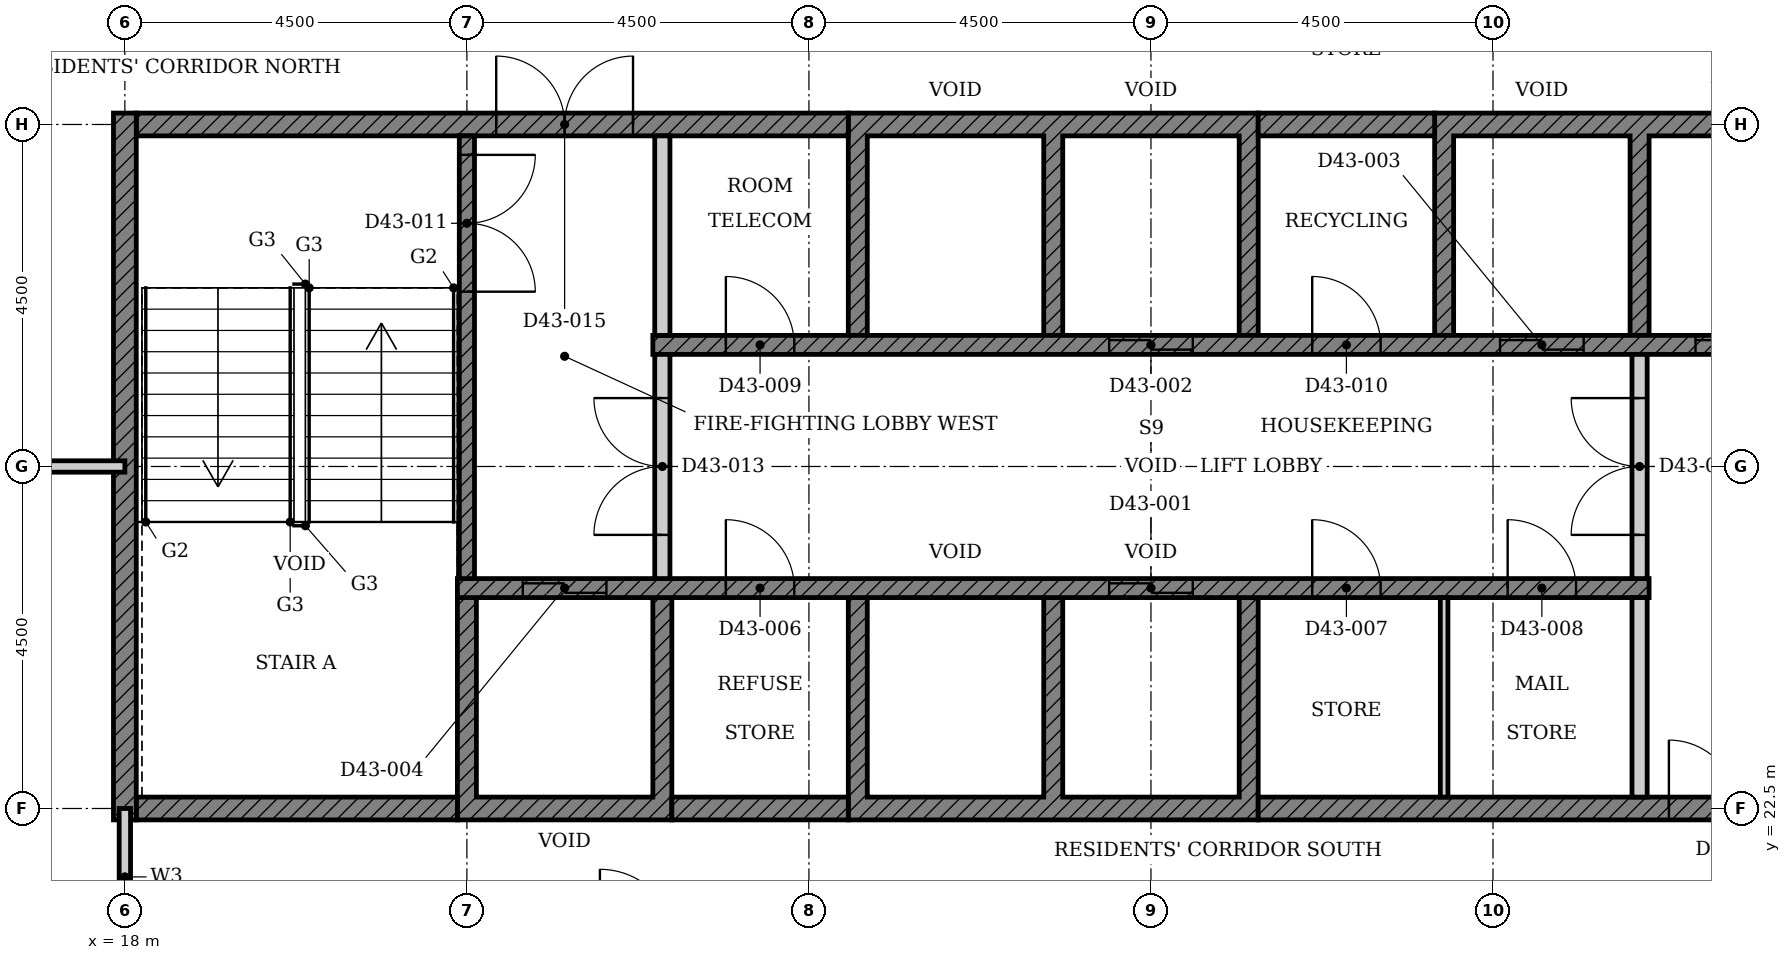
"""IFC4 building model, lengths in metres.
Left out: names, types, materials, properties, quantities, classifications, styles, units other than length and angle.
Written with IfcOpenShell. Run it as: python <this file> out.ifc"""

import sys

from ifc_helpers import new_model, si_unit, direction, frame, frame_2d, origin, place, context, subcontext, project, spatial, polyline, rectangle, outline, extrude, element, fill, save


model = new_model("IFC4")
c1 = context("Model", 3, precision=1e-05, world=origin(), true_north=direction((0.0, 1.0)))
c2 = subcontext(c1, "Body", "Model", "MODEL_VIEW")
j1 = project(units=[si_unit("LENGTHUNIT", "METRE"), si_unit("PLANEANGLEUNIT", "RADIAN")], contexts=[c1])
p1 = place(None, origin())
s1 = spatial("IfcSite", under=j1, at=p1, CompositionType="ELEMENT")
p2 = place(p1, origin())
s2 = spatial("IfcBuilding", under=s1, at=p2, CompositionType="ELEMENT")
p3 = place(p2, frame((0.0, 0.0, 172.8)))
s3 = spatial("IfcBuildingStorey", under=s2, at=p3, CompositionType="ELEMENT", Elevation=172.8)
p4 = place(p3, origin())
e1 = element("IfcWall", 1, at=p4, inside=s3, PredefinedType="SHEAR", context=c2, shape_type="SweptSolid", body=[
    extrude(outline(polyline([(22.375, 22.35), (25.197, 22.35), (25.197, 25.275), (24.947, 25.275), (24.947, 22.65), (22.625, 22.65), (22.625, 25.275), (22.375, 25.275), (22.375, 22.35)])), origin(), (0.0, 0.0, 1.0), 3.4),
])
p5 = place(p3, origin())
e2 = element("IfcWall", 2, at=p5, inside=s3, PredefinedType="SHEAR", context=c2, shape_type="SweptSolid", body=[
    extrude(outline(polyline([(27.518, 22.35), (32.911, 22.35), (32.911, 25.275), (32.661, 25.275), (32.661, 22.65), (30.339, 22.65), (30.339, 25.275), (30.089, 25.275), (30.089, 22.65), (27.768, 22.65), (27.768, 25.275), (27.518, 25.275), (27.518, 22.35)])), origin(), (0.0, 0.0, 1.0), 3.4),
])
p6 = place(p3, origin())
e3 = element("IfcWall", 3, at=p6, inside=s3, PredefinedType="SHEAR", context=c2, shape_type="SweptSolid", body=[
    extrude(outline(polyline([(27.518, 28.725), (27.768, 28.725), (27.768, 31.35), (30.089, 31.35), (30.089, 28.725), (30.339, 28.725), (30.339, 31.35), (32.661, 31.35), (32.661, 28.725), (32.911, 28.725), (32.911, 31.65), (27.518, 31.65), (27.518, 28.725)])), origin(), (0.0, 0.0, 1.0), 3.4),
])
p7 = place(p3, origin())
e4 = element("IfcWall", 4, at=p7, inside=s3, PredefinedType="SHEAR", context=c2, shape_type="SweptSolid", body=[
    extrude(outline(polyline([(35.232, 28.725), (35.482, 28.725), (35.482, 31.35), (37.803, 31.35), (37.803, 28.725), (38.053, 28.725), (38.053, 31.35), (40.375, 31.35), (40.375, 28.725), (40.625, 28.725), (40.625, 31.65), (35.232, 31.65), (35.232, 28.725)])), origin(), (0.0, 0.0, 1.0), 3.4),
])
p8 = place(p3, frame((18.15, 22.5, 0.0), z_axis=(0.0, 0.0, 1.0), x_axis=(1.0, 0.0, 0.0)))
e5 = element("IfcWall", 5, at=p8, inside=s3, PredefinedType="SHEAR", context=c2, shape_type="SweptSolid", body=[
    extrude(rectangle(XDim=4.225, YDim=0.3, at=frame_2d((2.113, 0.0))), origin(), (0.0, 0.0, 1.0), 3.4),
])
p9 = place(p3, frame((25.197, 22.5, 0.0), z_axis=(0.0, 0.0, 1.0), x_axis=(1.0, 0.0, 0.0)))
e6 = element("IfcWall", 6, at=p9, inside=s3, PredefinedType="SHEAR", context=c2, shape_type="SweptSolid", body=[
    extrude(rectangle(XDim=2.321, YDim=0.3, at=frame_2d((1.161, 0.0))), origin(), (0.0, 0.0, 1.0), 3.4),
])
p10 = place(p3, frame((32.911, 22.5, 0.0), z_axis=(0.0, 0.0, 1.0), x_axis=(1.0, 0.0, 0.0)))
e7 = element("IfcWall", 7, at=p10, inside=s3, PredefinedType="SHEAR", context=c2, shape_type="SweptSolid", body=[
    extrude(rectangle(XDim=11.939, YDim=0.3, at=frame_2d((5.97, 0.0))), origin(), (0.0, 0.0, 1.0), 3.4),
])
p11 = place(p10, frame((5.404, 0.0, 0.0)))
e8 = element("IfcOpeningElement", 8, at=p11, cuts=e7, PredefinedType="OPENING", context=c2, shape_type="SweptSolid", body=[
    extrude(rectangle(XDim=1.8, YDim=2.1, at=frame_2d((0.9, 1.05))), frame((0.0, 0.16, 0.0), z_axis=(0.0, -1.0, 0.0), x_axis=(1.0, 0.0, 0.0)), (0.0, 0.0, 1.0), 0.32),
])
p12 = place(p3, frame((18.15, 31.5, 0.0), z_axis=(0.0, 0.0, 1.0), x_axis=(1.0, 0.0, 0.0)))
e9 = element("IfcWall", 9, at=p12, inside=s3, PredefinedType="SHEAR", context=c2, shape_type="SweptSolid", body=[
    extrude(rectangle(XDim=9.368, YDim=0.3, at=frame_2d((4.684, 0.0))), origin(), (0.0, 0.0, 1.0), 3.4),
])
p13 = place(p12, frame((4.736, 0.0, 0.0)))
e10 = element("IfcOpeningElement", 10, at=p13, cuts=e9, PredefinedType="OPENING", context=c2, shape_type="SweptSolid", body=[
    extrude(rectangle(XDim=1.8, YDim=2.1, at=frame_2d((0.9, 1.05))), frame((0.0, 0.16, 0.0), z_axis=(0.0, -1.0, 0.0), x_axis=(1.0, 0.0, 0.0)), (0.0, 0.0, 1.0), 0.32),
])
p14 = place(p3, frame((32.911, 31.5, 0.0), z_axis=(0.0, 0.0, 1.0), x_axis=(1.0, 0.0, 0.0)))
e11 = element("IfcWall", 11, at=p14, inside=s3, PredefinedType="SHEAR", context=c2, shape_type="SweptSolid", body=[
    extrude(rectangle(XDim=2.322, YDim=0.3, at=frame_2d((1.161, 0.0))), origin(), (0.0, 0.0, 1.0), 3.4),
])
p15 = place(p3, frame((18.0, 22.35, 0.0), z_axis=(0.0, 0.0, 1.0), x_axis=(0.0, 1.0, 0.0)))
e12 = element("IfcWall", 12, at=p15, inside=s3, PredefinedType="SHEAR", context=c2, shape_type="SweptSolid", body=[
    extrude(rectangle(XDim=9.3, YDim=0.3, at=frame_2d((4.65, 0.0))), origin(), (0.0, 0.0, 1.0), 3.4),
])
p16 = place(p3, frame((22.375, 25.4, 0.0), z_axis=(0.0, 0.0, 1.0), x_axis=(1.0, 0.0, 0.0)))
e13 = element("IfcWall", 13, at=p16, inside=s3, PredefinedType="SHEAR", context=c2, shape_type="SweptSolid", body=[
    extrude(rectangle(XDim=15.678, YDim=0.25, at=frame_2d((7.839, 0.0))), origin(), (0.0, 0.0, 1.0), 3.4),
])
p17 = place(p16, frame((8.575, 0.0, 0.0)))
e14 = element("IfcOpeningElement", 14, at=p17, cuts=e13, PredefinedType="OPENING", context=c2, shape_type="SweptSolid", body=[
    extrude(rectangle(XDim=1.1, YDim=2.1, at=frame_2d((0.55, 1.05))), frame((0.0, 0.135, 0.0), z_axis=(0.0, -1.0, 0.0), x_axis=(1.0, 0.0, 0.0)), (0.0, 0.0, 1.0), 0.27),
])
p18 = place(p16, frame((0.861, 0.0, 0.0)))
e15 = element("IfcOpeningElement", 15, at=p18, cuts=e13, PredefinedType="OPENING", context=c2, shape_type="SweptSolid", body=[
    extrude(rectangle(XDim=1.1, YDim=2.1, at=frame_2d((0.55, 1.05))), frame((0.0, 0.135, 0.0), z_axis=(0.0, -1.0, 0.0), x_axis=(1.0, 0.0, 0.0)), (0.0, 0.0, 1.0), 0.27),
])
p19 = place(p16, frame((3.532, 0.0, 0.0)))
e16 = element("IfcOpeningElement", 16, at=p19, cuts=e13, PredefinedType="OPENING", context=c2, shape_type="SweptSolid", body=[
    extrude(rectangle(XDim=0.9, YDim=2.1, at=frame_2d((0.45, 1.05))), frame((0.0, 0.135, 0.0), z_axis=(0.0, -1.0, 0.0), x_axis=(1.0, 0.0, 0.0)), (0.0, 0.0, 1.0), 0.27),
])
p20 = place(p16, frame((11.246, 0.0, 0.0)))
e17 = element("IfcOpeningElement", 17, at=p20, cuts=e13, PredefinedType="OPENING", context=c2, shape_type="SweptSolid", body=[
    extrude(rectangle(XDim=0.9, YDim=2.1, at=frame_2d((0.45, 1.05))), frame((0.0, 0.135, 0.0), z_axis=(0.0, -1.0, 0.0), x_axis=(1.0, 0.0, 0.0)), (0.0, 0.0, 1.0), 0.27),
])
p21 = place(p16, frame((13.818, 0.0, 0.0)))
e18 = element("IfcOpeningElement", 18, at=p21, cuts=e13, PredefinedType="OPENING", context=c2, shape_type="SweptSolid", body=[
    extrude(rectangle(XDim=0.9, YDim=2.1, at=frame_2d((0.45, 1.05))), frame((0.0, 0.135, 0.0), z_axis=(0.0, -1.0, 0.0), x_axis=(1.0, 0.0, 0.0)), (0.0, 0.0, 1.0), 0.27),
])
p22 = place(p3, frame((24.947, 28.6, 0.0), z_axis=(0.0, 0.0, 1.0), x_axis=(1.0, 0.0, 0.0)))
e19 = element("IfcWall", 19, at=p22, inside=s3, PredefinedType="SHEAR", context=c2, shape_type="SweptSolid", body=[
    extrude(rectangle(XDim=15.678, YDim=0.25, at=frame_2d((7.839, 0.0))), origin(), (0.0, 0.0, 1.0), 3.4),
])
p23 = place(p22, frame((6.004, 0.0, 0.0)))
e20 = element("IfcOpeningElement", 20, at=p23, cuts=e19, PredefinedType="OPENING", context=c2, shape_type="SweptSolid", body=[
    extrude(rectangle(XDim=1.1, YDim=2.1, at=frame_2d((0.55, 1.05))), frame((0.0, 0.135, 0.0), z_axis=(0.0, -1.0, 0.0), x_axis=(1.0, 0.0, 0.0)), (0.0, 0.0, 1.0), 0.27),
])
p24 = place(p22, frame((11.146, 0.0, 0.0)))
e21 = element("IfcOpeningElement", 21, at=p24, cuts=e19, PredefinedType="OPENING", context=c2, shape_type="SweptSolid", body=[
    extrude(rectangle(XDim=1.1, YDim=2.1, at=frame_2d((0.55, 1.05))), frame((0.0, 0.135, 0.0), z_axis=(0.0, -1.0, 0.0), x_axis=(1.0, 0.0, 0.0)), (0.0, 0.0, 1.0), 0.27),
])
p25 = place(p22, frame((13.718, 0.0, 0.0)))
e22 = element("IfcOpeningElement", 22, at=p25, cuts=e19, PredefinedType="OPENING", context=c2, shape_type="SweptSolid", body=[
    extrude(rectangle(XDim=1.1, YDim=2.1, at=frame_2d((0.55, 1.05))), frame((0.0, 0.135, 0.0), z_axis=(0.0, -1.0, 0.0), x_axis=(1.0, 0.0, 0.0)), (0.0, 0.0, 1.0), 0.27),
])
p26 = place(p22, frame((0.961, 0.0, 0.0)))
e23 = element("IfcOpeningElement", 23, at=p26, cuts=e19, PredefinedType="OPENING", context=c2, shape_type="SweptSolid", body=[
    extrude(rectangle(XDim=0.9, YDim=2.1, at=frame_2d((0.45, 1.05))), frame((0.0, 0.135, 0.0), z_axis=(0.0, -1.0, 0.0), x_axis=(1.0, 0.0, 0.0)), (0.0, 0.0, 1.0), 0.27),
])
p27 = place(p22, frame((8.675, 0.0, 0.0)))
e24 = element("IfcOpeningElement", 24, at=p27, cuts=e19, PredefinedType="OPENING", context=c2, shape_type="SweptSolid", body=[
    extrude(rectangle(XDim=0.9, YDim=2.1, at=frame_2d((0.45, 1.05))), frame((0.0, 0.135, 0.0), z_axis=(0.0, -1.0, 0.0), x_axis=(1.0, 0.0, 0.0)), (0.0, 0.0, 1.0), 0.27),
])
p28 = place(p3, frame((37.928, 22.65, 0.0), z_axis=(0.0, 0.0, 1.0), x_axis=(0.0, 1.0, 0.0)))
e25 = element("IfcWall", 25, at=p28, inside=s3, PredefinedType="PARTITIONING", context=c2, shape_type="SweptSolid", body=[
    extrude(rectangle(XDim=2.625, YDim=0.2, at=frame_2d((1.312, 0.0))), origin(), (0.0, 0.0, 1.0), 3.4),
])
p29 = place(p3, frame((35.357, 22.65, 0.0), z_axis=(0.0, 0.0, 1.0), x_axis=(0.0, 1.0, 0.0)))
e26 = element("IfcWall", 26, at=p29, inside=s3, PredefinedType="PARTITIONING", context=c2, shape_type="SweptSolid", body=[
    extrude(rectangle(XDim=2.625, YDim=0.1, at=frame_2d((1.312, 0.0))), origin(), (0.0, 0.0, 1.0), 3.4),
])
p30 = place(p3, frame((25.072, 28.725, 0.0), z_axis=(0.0, 0.0, 1.0), x_axis=(0.0, 1.0, 0.0)))
e27 = element("IfcWall", 27, at=p30, inside=s3, PredefinedType="PARTITIONING", context=c2, shape_type="SweptSolid", body=[
    extrude(rectangle(XDim=2.625, YDim=0.2, at=frame_2d((1.312, 0.0))), origin(), (0.0, 0.0, 1.0), 3.4),
])
p31 = place(p3, frame((22.5, 31.35, 0.0), z_axis=(0.0, 0.0, 1.0), x_axis=(0.0, -1.0, 0.0)))
e28 = element("IfcWall", 28, at=p31, inside=s3, PredefinedType="SHEAR", context=c2, shape_type="SweptSolid", body=[
    extrude(rectangle(XDim=5.825, YDim=0.2, at=frame_2d((2.913, 0.0))), origin(), (0.0, 0.0, 1.0), 3.4),
])
p32 = place(p31, frame((0.25, 0.0, 0.0)))
e29 = element("IfcOpeningElement", 29, at=p32, cuts=e28, PredefinedType="OPENING", context=c2, shape_type="SweptSolid", body=[
    extrude(rectangle(XDim=1.8, YDim=2.1, at=frame_2d((0.9, 1.05))), frame((0.0, 0.11, 0.0), z_axis=(0.0, -1.0, 0.0), x_axis=(1.0, 0.0, 0.0)), (0.0, 0.0, 1.0), 0.22),
])
p33 = place(p3, frame((25.072, 25.525, 0.0), z_axis=(0.0, 0.0, 1.0), x_axis=(0.0, 1.0, 0.0)))
e30 = element("IfcWall", 30, at=p33, inside=s3, PredefinedType="PARTITIONING", context=c2, shape_type="SweptSolid", body=[
    extrude(rectangle(XDim=2.95, YDim=0.2, at=frame_2d((1.475, 0.0))), origin(), (0.0, 0.0, 1.0), 3.4),
])
p34 = place(p33, frame((0.575, 0.0, 0.0)))
e31 = element("IfcOpeningElement", 31, at=p34, cuts=e30, PredefinedType="OPENING", context=c2, shape_type="SweptSolid", body=[
    extrude(rectangle(XDim=1.8, YDim=2.1, at=frame_2d((0.9, 1.05))), frame((0.0, 0.11, 0.0), z_axis=(0.0, -1.0, 0.0), x_axis=(1.0, 0.0, 0.0)), (0.0, 0.0, 1.0), 0.22),
])
p35 = place(p3, frame((37.928, 25.525, 0.0), z_axis=(0.0, 0.0, 1.0), x_axis=(0.0, 1.0, 0.0)))
e32 = element("IfcWall", 32, at=p35, inside=s3, PredefinedType="PARTITIONING", context=c2, shape_type="SweptSolid", body=[
    extrude(rectangle(XDim=2.95, YDim=0.2, at=frame_2d((1.475, 0.0))), origin(), (0.0, 0.0, 1.0), 3.4),
])
p36 = place(p35, frame((0.575, 0.0, 0.0)))
e33 = element("IfcOpeningElement", 33, at=p36, cuts=e32, PredefinedType="OPENING", context=c2, shape_type="SweptSolid", body=[
    extrude(rectangle(XDim=1.8, YDim=2.1, at=frame_2d((0.9, 1.05))), frame((0.0, 0.11, 0.0), z_axis=(0.0, -1.0, 0.0), x_axis=(1.0, 0.0, 0.0)), (0.0, 0.0, 1.0), 0.22),
])
p37 = place(p3, frame((4.5, 27.0, 0.0), z_axis=(0.0, 0.0, 1.0), x_axis=(1.0, 0.0, 0.0)))
e34 = element("IfcWall", 34, at=p37, inside=s3, PredefinedType="PARTITIONING", context=c2, shape_type="SweptSolid", body=[
    extrude(rectangle(XDim=13.5, YDim=0.15, at=frame_2d((6.75, 0.0))), origin(), (0.0, 0.0, 1.0), 2.68),
])
p38 = place(p37, frame((5.35, 0.0, 0.0)))
e35 = element("IfcOpeningElement", 35, at=p38, cuts=e34, PredefinedType="OPENING", context=c2, shape_type="SweptSolid", body=[
    extrude(rectangle(XDim=1.0, YDim=2.1, at=frame_2d((0.5, 1.05))), frame((0.0, 0.085, 0.0), z_axis=(0.0, -1.0, 0.0), x_axis=(1.0, 0.0, 0.0)), (0.0, 0.0, 1.0), 0.17),
])
p39 = place(p3, frame((18.0, 20.7, 0.0), z_axis=(0.0, 0.0, 1.0), x_axis=(0.0, 1.0, 0.0)))
e36 = element("IfcWall", 36, at=p39, inside=s3, PredefinedType="PARTITIONING", context=c2, shape_type="SweptSolid", body=[
    extrude(rectangle(XDim=1.8, YDim=0.15, at=frame_2d((0.9, 0.0))), origin(), (0.0, 0.0, 1.0), 3.4),
])
p40 = place(p17, origin())
e37 = element("IfcDoor", 37, at=p40, inside=s3, OperationType="DOUBLE_DOOR_SLIDING", PredefinedType="DOOR", context=c2, shape_type="SweptSolid", body=[
    extrude(rectangle(XDim=1.1, YDim=2.1, at=frame_2d((0.55, 1.05))), frame((0.0, 0.025, 0.0), z_axis=(0.0, -1.0, 0.0), x_axis=(1.0, 0.0, 0.0)), (0.0, 0.0, 1.0), 0.05),
])
fill(e14, e37)
p41 = place(p23, origin())
e38 = element("IfcDoor", 38, at=p41, inside=s3, OperationType="DOUBLE_DOOR_SLIDING", PredefinedType="DOOR", context=c2, shape_type="SweptSolid", body=[
    extrude(rectangle(XDim=1.1, YDim=2.1, at=frame_2d((0.55, 1.05))), frame((0.0, 0.025, 0.0), z_axis=(0.0, -1.0, 0.0), x_axis=(1.0, 0.0, 0.0)), (0.0, 0.0, 1.0), 0.05),
])
fill(e20, e38)
p42 = place(p24, origin())
e39 = element("IfcDoor", 39, at=p42, inside=s3, OperationType="DOUBLE_DOOR_SLIDING", PredefinedType="DOOR", context=c2, shape_type="SweptSolid", body=[
    extrude(rectangle(XDim=1.1, YDim=2.1, at=frame_2d((0.55, 1.05))), frame((0.0, 0.025, 0.0), z_axis=(0.0, -1.0, 0.0), x_axis=(1.0, 0.0, 0.0)), (0.0, 0.0, 1.0), 0.05),
])
fill(e21, e39)
p43 = place(p18, origin())
e40 = element("IfcDoor", 40, at=p43, inside=s3, OperationType="DOUBLE_DOOR_SLIDING", PredefinedType="DOOR", context=c2, shape_type="SweptSolid", body=[
    extrude(rectangle(XDim=1.1, YDim=2.1, at=frame_2d((0.55, 1.05))), frame((0.0, 0.025, 0.0), z_axis=(0.0, -1.0, 0.0), x_axis=(1.0, 0.0, 0.0)), (0.0, 0.0, 1.0), 0.05),
])
fill(e15, e40)
p44 = place(p25, origin())
e41 = element("IfcDoor", 41, at=p44, inside=s3, OperationType="DOUBLE_DOOR_SLIDING", PredefinedType="DOOR", context=c2, shape_type="SweptSolid", body=[
    extrude(rectangle(XDim=1.1, YDim=2.1, at=frame_2d((0.55, 1.05))), frame((0.0, 0.025, 0.0), z_axis=(0.0, -1.0, 0.0), x_axis=(1.0, 0.0, 0.0)), (0.0, 0.0, 1.0), 0.05),
])
fill(e22, e41)
p45 = place(p19, origin())
e42 = element("IfcDoor", 42, at=p45, inside=s3, OperationType="SINGLE_SWING_LEFT", PredefinedType="DOOR", context=c2, shape_type="SweptSolid", body=[
    extrude(rectangle(XDim=0.9, YDim=2.1, at=frame_2d((0.45, 1.05))), frame((0.0, 0.025, 0.0), z_axis=(0.0, -1.0, 0.0), x_axis=(1.0, 0.0, 0.0)), (0.0, 0.0, 1.0), 0.05),
])
fill(e16, e42)
p46 = place(p20, origin())
e43 = element("IfcDoor", 43, at=p46, inside=s3, OperationType="SINGLE_SWING_LEFT", PredefinedType="DOOR", context=c2, shape_type="SweptSolid", body=[
    extrude(rectangle(XDim=0.9, YDim=2.1, at=frame_2d((0.45, 1.05))), frame((0.0, 0.025, 0.0), z_axis=(0.0, -1.0, 0.0), x_axis=(1.0, 0.0, 0.0)), (0.0, 0.0, 1.0), 0.05),
])
fill(e17, e43)
p47 = place(p21, origin())
e44 = element("IfcDoor", 44, at=p47, inside=s3, OperationType="SINGLE_SWING_LEFT", PredefinedType="DOOR", context=c2, shape_type="SweptSolid", body=[
    extrude(rectangle(XDim=0.9, YDim=2.1, at=frame_2d((0.45, 1.05))), frame((0.0, 0.025, 0.0), z_axis=(0.0, -1.0, 0.0), x_axis=(1.0, 0.0, 0.0)), (0.0, 0.0, 1.0), 0.05),
])
fill(e18, e44)
p48 = place(p26, origin())
e45 = element("IfcDoor", 45, at=p48, inside=s3, OperationType="SINGLE_SWING_LEFT", PredefinedType="DOOR", context=c2, shape_type="SweptSolid", body=[
    extrude(rectangle(XDim=0.9, YDim=2.1, at=frame_2d((0.45, 1.05))), frame((0.0, 0.025, 0.0), z_axis=(0.0, -1.0, 0.0), x_axis=(1.0, 0.0, 0.0)), (0.0, 0.0, 1.0), 0.05),
])
fill(e23, e45)
p49 = place(p27, origin())
e46 = element("IfcDoor", 46, at=p49, inside=s3, OperationType="SINGLE_SWING_LEFT", PredefinedType="DOOR", context=c2, shape_type="SweptSolid", body=[
    extrude(rectangle(XDim=0.9, YDim=2.1, at=frame_2d((0.45, 1.05))), frame((0.0, 0.025, 0.0), z_axis=(0.0, -1.0, 0.0), x_axis=(1.0, 0.0, 0.0)), (0.0, 0.0, 1.0), 0.05),
])
fill(e24, e46)
p50 = place(p32, origin())
e47 = element("IfcDoor", 47, at=p50, inside=s3, OperationType="DOUBLE_DOOR_SINGLE_SWING", PredefinedType="DOOR", context=c2, shape_type="SweptSolid", body=[
    extrude(rectangle(XDim=1.8, YDim=2.1, at=frame_2d((0.9, 1.05))), frame((0.0, 0.025, 0.0), z_axis=(0.0, -1.0, 0.0), x_axis=(1.0, 0.0, 0.0)), (0.0, 0.0, 1.0), 0.05),
])
fill(e29, e47)
p51 = place(p34, origin())
e48 = element("IfcDoor", 48, at=p51, inside=s3, OperationType="DOUBLE_DOOR_SINGLE_SWING", PredefinedType="DOOR", context=c2, shape_type="SweptSolid", body=[
    extrude(rectangle(XDim=1.8, YDim=2.1, at=frame_2d((0.9, 1.05))), frame((0.0, 0.025, 0.0), z_axis=(0.0, -1.0, 0.0), x_axis=(1.0, 0.0, 0.0)), (0.0, 0.0, 1.0), 0.05),
])
fill(e31, e48)
p52 = place(p36, origin())
e49 = element("IfcDoor", 49, at=p52, inside=s3, OperationType="DOUBLE_DOOR_SINGLE_SWING", PredefinedType="DOOR", context=c2, shape_type="SweptSolid", body=[
    extrude(rectangle(XDim=1.8, YDim=2.1, at=frame_2d((0.9, 1.05))), frame((0.0, 0.025, 0.0), z_axis=(0.0, -1.0, 0.0), x_axis=(1.0, 0.0, 0.0)), (0.0, 0.0, 1.0), 0.05),
])
fill(e33, e49)
p53 = place(p13, origin())
e50 = element("IfcDoor", 50, at=p53, inside=s3, OperationType="DOUBLE_DOOR_SINGLE_SWING", PredefinedType="DOOR", context=c2, shape_type="SweptSolid", body=[
    extrude(rectangle(XDim=1.8, YDim=2.1, at=frame_2d((0.9, 1.05))), frame((0.0, 0.025, 0.0), z_axis=(0.0, -1.0, 0.0), x_axis=(1.0, 0.0, 0.0)), (0.0, 0.0, 1.0), 0.05),
])
fill(e10, e50)
p54 = place(p11, origin())
e51 = element("IfcDoor", 51, at=p54, inside=s3, OperationType="DOUBLE_DOOR_SINGLE_SWING", PredefinedType="DOOR", context=c2, shape_type="SweptSolid", body=[
    extrude(rectangle(XDim=1.8, YDim=2.1, at=frame_2d((0.9, 1.05))), frame((0.0, 0.025, 0.0), z_axis=(0.0, -1.0, 0.0), x_axis=(1.0, 0.0, 0.0)), (0.0, 0.0, 1.0), 0.05),
])
fill(e8, e51)
save(model, sys.argv[1])
